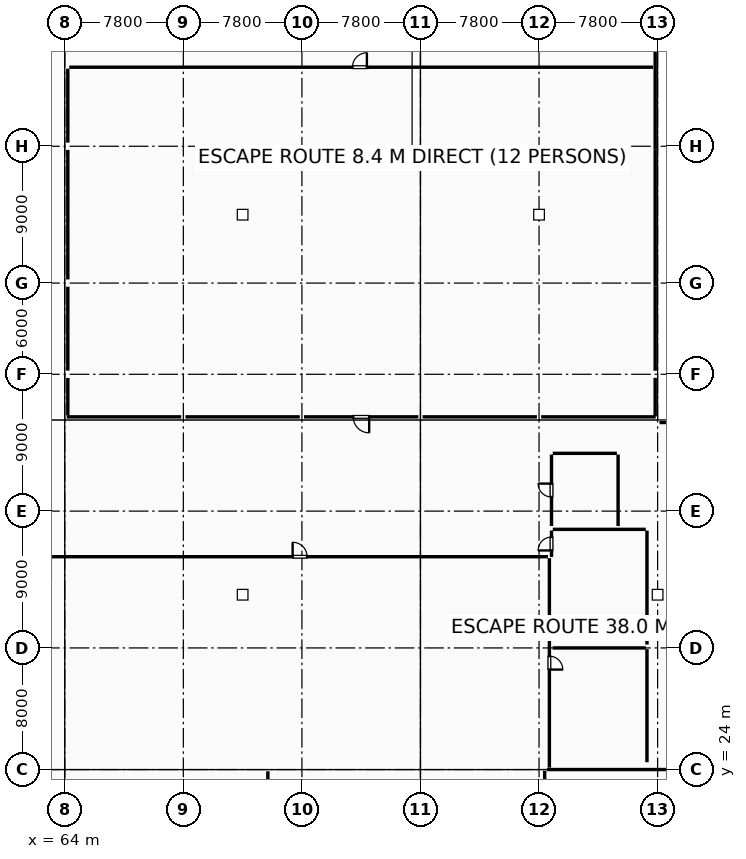
"""IFC4 building model, lengths in metres.
Left out: names, types, materials, properties, quantities, classifications, styles, units other than length and angle.
Written with IfcOpenShell. Run it as: python <this file> out.ifc"""

import sys

from ifc_helpers import new_model, si_unit, direction, frame, frame_2d, origin, origin_2d, place, context, subcontext, project, spatial, rectangle, hollow_rectangle, i_section, extrude, element, fill, save


model = new_model("IFC4")
c1 = context("Model", 3, precision=1e-05, world=origin(), true_north=direction((0.0, 1.0)))
c2 = subcontext(c1, "Body", "Model", "MODEL_VIEW")
j1 = project(units=[si_unit("LENGTHUNIT", "METRE"), si_unit("PLANEANGLEUNIT", "RADIAN")], contexts=[c1])
p1 = place(None, origin())
s1 = spatial("IfcSite", under=j1, at=p1, CompositionType="ELEMENT")
p2 = place(p1, origin())
s2 = spatial("IfcBuilding", under=s1, at=p2, CompositionType="ELEMENT")
p3 = place(p2, origin())
s3 = spatial("IfcBuildingStorey", under=s2, at=p3, CompositionType="ELEMENT", Elevation=0.0)
p4 = place(p3, frame((64.0, 50.0, 0.0), z_axis=(0.0, 0.0, 1.0), x_axis=(1.0, 0.0, 0.0)))
e1 = element("IfcColumn", 1, at=p4, inside=s3, PredefinedType="COLUMN", context=c2, shape_type="SweptSolid", body=[
    extrude(hollow_rectangle(XDim=0.45, YDim=0.45, WallThickness=0.02, at=origin_2d()), origin(), (0.0, 0.0, 1.0), 5.4),
])
for number, where, z_axis, x_axis in (
    (2, (64.0, 56.0, 0.0), (0.0, 0.0, 1.0), (1.0, 0.0, 0.0)),
    (3, (64.0, 65.0, 0.0), (0.0, 0.0, 1.0), (1.0, 0.0, 0.0)),
):
    element("IfcColumn", number, at=place(p3, frame(where, z_axis=z_axis, x_axis=x_axis)), inside=s3, PredefinedType="COLUMN", context=c2, shape_type="SweptSolid", body=[
        extrude(i_section(OverallWidth=0.25, OverallDepth=0.45, WebThickness=0.011, FlangeThickness=0.014, FilletRadius=0.015, at=origin_2d()), origin(), (0.0, 0.0, 1.0), 5.4),
    ])
p5 = place(p3, frame((103.0, 50.0, 0.0), z_axis=(0.0, 0.0, 1.0), x_axis=(1.0, 0.0, 0.0)))
e4 = element("IfcColumn", 4, at=p5, inside=s3, PredefinedType="COLUMN", context=c2, shape_type="SweptSolid", body=[
    extrude(hollow_rectangle(XDim=0.45, YDim=0.45, WallThickness=0.02, at=origin_2d()), origin(), (0.0, 0.0, 1.0), 5.4),
])
for number, where, z_axis, x_axis in (
    (5, (103.0, 56.0, 0.0), (0.0, 0.0, 1.0), (1.0, 0.0, 0.0)),
    (6, (103.0, 65.0, 0.0), (0.0, 0.0, 1.0), (1.0, 0.0, 0.0)),
    (7, (64.0, 47.0, 0.0), (0.0, 0.0, 1.0), (1.0, 0.0, 0.0)),
    (8, (71.8, 47.0, 0.0), (0.0, 0.0, 1.0), (1.0, 0.0, 0.0)),
    (9, (79.6, 47.0, 0.0), (0.0, 0.0, 1.0), (1.0, 0.0, 0.0)),
    (10, (87.4, 47.0, 0.0), (0.0, 0.0, 1.0), (1.0, 0.0, 0.0)),
    (11, (95.2, 47.0, 0.0), (0.0, 0.0, 1.0), (1.0, 0.0, 0.0)),
    (12, (103.0, 47.0, 0.0), (0.0, 0.0, 1.0), (1.0, 0.0, 0.0)),
):
    element("IfcColumn", number, at=place(p3, frame(where, z_axis=z_axis, x_axis=x_axis)), inside=s3, PredefinedType="COLUMN", context=c2, shape_type="SweptSolid", body=[
        extrude(i_section(OverallWidth=0.25, OverallDepth=0.45, WebThickness=0.011, FlangeThickness=0.014, FilletRadius=0.015, at=origin_2d()), origin(), (0.0, 0.0, 1.0), 5.4),
    ])
p6 = place(p3, frame((70.0, 41.0, 0.0), z_axis=(0.0, 0.0, 1.0), x_axis=(1.0, 0.0, 0.0)))
e13 = element("IfcColumn", 13, at=p6, inside=s3, PredefinedType="COLUMN", context=c2, shape_type="SweptSolid", body=[
    extrude(rectangle(XDim=1.2, YDim=1.2, at=origin_2d()), origin(), (0.0, 0.0, 1.0), 5.4),
])
for number, where, z_axis, x_axis in (
    (14, (79.6, 41.0, 0.0), (0.0, 0.0, 1.0), (1.0, 0.0, 0.0)),
    (15, (87.4, 41.0, 0.0), (0.0, 0.0, 1.0), (1.0, 0.0, 0.0)),
    (16, (95.2, 41.0, 0.0), (0.0, 0.0, 1.0), (1.0, 0.0, 0.0)),
    (17, (103.0, 41.0, 0.0), (0.0, 0.0, 1.0), (1.0, 0.0, 0.0)),
):
    element("IfcColumn", number, at=place(p3, frame(where, z_axis=z_axis, x_axis=x_axis)), inside=s3, PredefinedType="COLUMN", context=c2, shape_type="SweptSolid", body=[
        extrude(rectangle(XDim=1.05, YDim=1.05, at=origin_2d()), origin(), (0.0, 0.0, 1.0), 5.4),
    ])
p7 = place(p3, frame((102.84, 73.767, 0.0), z_axis=(0.0, 0.0, 1.0), x_axis=(0.0, -1.0, 0.0)))
e18 = element("IfcWall", 18, at=p7, inside=s3, PredefinedType="STANDARD", context=c2, shape_type="SweptSolid", body=[
    extrude(rectangle(XDim=9.0, YDim=0.28, at=frame_2d((4.5, 0.0))), origin(), (0.0, 0.0, 1.0), 4.555),
])
p8 = place(p3, frame((102.84, 64.767, 0.0), z_axis=(0.0, 0.0, 1.0), x_axis=(0.0, -1.0, 0.0)))
e19 = element("IfcWall", 19, at=p8, inside=s3, PredefinedType="STANDARD", context=c2, shape_type="SweptSolid", body=[
    extrude(rectangle(XDim=9.0, YDim=0.28, at=frame_2d((4.5, 0.0))), origin(), (0.0, 0.0, 1.0), 4.505),
])
p9 = place(p3, frame((102.84, 55.767, 0.0), z_axis=(0.0, 0.0, 1.0), x_axis=(0.0, -1.0, 0.0)))
e20 = element("IfcWall", 20, at=p9, inside=s3, PredefinedType="STANDARD", context=c2, shape_type="SweptSolid", body=[
    extrude(rectangle(XDim=5.534, YDim=0.28, at=frame_2d((2.767, 0.0))), origin(), (0.0, 0.0, 1.0), 4.655),
])
p10 = place(p3, frame((102.84, 49.767, 0.0), z_axis=(0.0, 0.0, 1.0), x_axis=(0.0, -1.0, 0.0)))
e21 = element("IfcWall", 21, at=p10, inside=s3, PredefinedType="STANDARD", context=c2, shape_type="SweptSolid", body=[
    extrude(rectangle(XDim=2.534, YDim=0.28, at=frame_2d((1.267, 0.0))), origin(), (0.0, 0.0, 1.0), 4.455),
])
p11 = place(p3, frame((103.124, 46.83, 0.0), z_axis=(0.0, 0.0, 1.0), x_axis=(1.0, 0.0, 0.0)))
e22 = element("IfcWall", 22, at=p11, inside=s3, PredefinedType="STANDARD", context=c2, shape_type="SweptSolid", body=[
    extrude(rectangle(XDim=15.872, YDim=0.3, at=frame_2d((7.936, 0.0))), origin(), (0.0, 0.0, 1.0), 4.305),
])
p12 = place(p11, frame((7.126, 0.0, 0.95)))
e23 = element("IfcOpeningElement", 23, at=p12, cuts=e22, PredefinedType="OPENING", context=c2, shape_type="SweptSolid", body=[
    extrude(rectangle(XDim=1.1, YDim=1.5, at=frame_2d((0.55, 0.75))), frame((0.0, 0.16, 0.0), z_axis=(0.0, -1.0, 0.0), x_axis=(1.0, 0.0, 0.0)), (0.0, 0.0, 1.0), 0.32),
])
p13 = place(p3, frame((63.145, 38.0, 0.0), z_axis=(0.0, 0.0, 1.0), x_axis=(1.0, 0.0, 0.0)))
e24 = element("IfcWall", 24, at=p13, inside=s3, PredefinedType="PARTITIONING", context=c2, shape_type="SweptSolid", body=[
    extrude(rectangle(XDim=32.64, YDim=0.15, at=frame_2d((16.32, 0.0))), origin(), (0.0, 0.0, 1.0), 4.3),
])
p14 = place(p13, frame((15.845, 0.0, 0.0)))
e25 = element("IfcOpeningElement", 25, at=p14, cuts=e24, PredefinedType="OPENING", context=c2, shape_type="SweptSolid", body=[
    extrude(rectangle(XDim=0.95, YDim=2.15, at=frame_2d((0.475, 1.075))), frame((0.0, 0.085, 0.0), z_axis=(0.0, -1.0, 0.0), x_axis=(1.0, 0.0, 0.0)), (0.0, 0.0, 1.0), 0.17),
])
p15 = place(p3, frame((95.88, 37.905, 0.0), z_axis=(0.0, 0.0, 1.0), x_axis=(0.0, -1.0, 0.0)))
e26 = element("IfcWall", 26, at=p15, inside=s3, PredefinedType="PARTITIONING", context=c2, shape_type="SweptSolid", body=[
    extrude(rectangle(XDim=13.78, YDim=0.15, at=frame_2d((6.89, 0.0))), origin(), (0.0, 0.0, 1.0), 5.4),
])
p16 = place(p15, frame((6.45, 0.0, 0.0)))
e27 = element("IfcOpeningElement", 27, at=p16, cuts=e26, PredefinedType="OPENING", context=c2, shape_type="SweptSolid", body=[
    extrude(rectangle(XDim=0.88, YDim=2.1, at=frame_2d((0.44, 1.05))), frame((0.0, 0.085, 0.0), z_axis=(0.0, -1.0, 0.0), x_axis=(1.0, 0.0, 0.0)), (0.0, 0.0, 1.0), 0.17),
])
p17 = place(p3, frame((95.57, 23.905, 0.0), z_axis=(0.0, 0.0, 1.0), x_axis=(0.0, -1.0, 0.0)))
e28 = element("IfcWall", 28, at=p17, inside=s3, PredefinedType="PARTITIONING", context=c2, shape_type="SweptSolid", body=[
    extrude(rectangle(XDim=7.365, YDim=0.15, at=frame_2d((3.683, 0.0))), origin(), (0.0, 0.0, 1.0), 4.3),
])
p18 = place(p17, frame((3.158, 0.0, 0.0)))
e29 = element("IfcOpeningElement", 29, at=p18, cuts=e28, PredefinedType="OPENING", context=c2, shape_type="SweptSolid", body=[
    extrude(rectangle(XDim=1.05, YDim=2.15, at=frame_2d((0.525, 1.075))), frame((0.0, 0.085, 0.0), z_axis=(0.0, -1.0, 0.0), x_axis=(1.0, 0.0, 0.0)), (0.0, 0.0, 1.0), 0.17),
])
p19 = place(p3, frame((95.72, 24.0, 0.0), z_axis=(0.0, 0.0, 1.0), x_axis=(1.0, 0.0, 0.0)))
e30 = element("IfcWall", 30, at=p19, inside=s3, PredefinedType="PARTITIONING", context=c2, shape_type="SweptSolid", body=[
    extrude(rectangle(XDim=16.36, YDim=0.2, at=frame_2d((8.18, 0.0))), origin(), (0.0, 0.0, 1.0), 4.3),
])
p20 = place(p3, frame((64.295, 70.2, 0.0), z_axis=(0.0, 0.0, 1.0), x_axis=(1.0, 0.0, 0.0)))
e31 = element("IfcWall", 31, at=p20, inside=s3, PredefinedType="PARTITIONING", context=c2, shape_type="SweptSolid", body=[
    extrude(rectangle(XDim=38.401, YDim=0.15, at=frame_2d((19.201, 0.0))), origin(), (0.0, 0.0, 1.0), 5.11),
])
p21 = place(p20, frame((18.63, 0.0, 0.0)))
e32 = element("IfcOpeningElement", 32, at=p21, cuts=e31, PredefinedType="OPENING", context=c2, shape_type="SweptSolid", body=[
    extrude(rectangle(XDim=0.95, YDim=2.15, at=frame_2d((0.475, 1.075))), frame((0.0, 0.085, 0.0), z_axis=(0.0, -1.0, 0.0), x_axis=(1.0, 0.0, 0.0)), (0.0, 0.0, 1.0), 0.17),
])
p22 = place(p3, frame((102.871, 47.2, 0.0), z_axis=(0.0, 0.0, 1.0), x_axis=(-1.0, 0.0, 0.0)))
e33 = element("IfcWall", 33, at=p22, inside=s3, PredefinedType="PARTITIONING", context=c2, shape_type="SweptSolid", body=[
    extrude(rectangle(XDim=7.531, YDim=0.15, at=frame_2d((3.766, 0.0))), origin(), (0.0, 0.0, 1.0), 4.3),
])
p23 = place(p3, frame((95.06, 47.2, 0.0), z_axis=(0.0, 0.0, 1.0), x_axis=(-1.0, 0.0, 0.0)))
e34 = element("IfcWall", 34, at=p23, inside=s3, PredefinedType="PARTITIONING", context=c2, shape_type="SweptSolid", body=[
    extrude(rectangle(XDim=7.52, YDim=0.15, at=frame_2d((3.76, 0.0))), origin(), (0.0, 0.0, 1.0), 4.3),
])
p24 = place(p3, frame((87.26, 47.2, 0.0), z_axis=(0.0, 0.0, 1.0), x_axis=(-1.0, 0.0, 0.0)))
e35 = element("IfcWall", 35, at=p24, inside=s3, PredefinedType="PARTITIONING", context=c2, shape_type="SweptSolid", body=[
    extrude(rectangle(XDim=7.52, YDim=0.15, at=frame_2d((3.76, 0.0))), origin(), (0.0, 0.0, 1.0), 4.3),
])
p25 = place(p24, frame((3.235, 0.0, 0.0)))
e36 = element("IfcOpeningElement", 36, at=p25, cuts=e35, PredefinedType="OPENING", context=c2, shape_type="SweptSolid", body=[
    extrude(rectangle(XDim=1.05, YDim=2.15, at=frame_2d((0.525, 1.075))), frame((0.0, 0.085, 0.0), z_axis=(0.0, -1.0, 0.0), x_axis=(1.0, 0.0, 0.0)), (0.0, 0.0, 1.0), 0.17),
])
p26 = place(p3, frame((79.46, 47.2, 0.0), z_axis=(0.0, 0.0, 1.0), x_axis=(-1.0, 0.0, 0.0)))
e37 = element("IfcWall", 37, at=p26, inside=s3, PredefinedType="PARTITIONING", context=c2, shape_type="SweptSolid", body=[
    extrude(rectangle(XDim=7.52, YDim=0.15, at=frame_2d((3.76, 0.0))), origin(), (0.0, 0.0, 1.0), 4.3),
])
p27 = place(p3, frame((71.66, 47.2, 0.0), z_axis=(0.0, 0.0, 1.0), x_axis=(-1.0, 0.0, 0.0)))
e38 = element("IfcWall", 38, at=p27, inside=s3, PredefinedType="PARTITIONING", context=c2, shape_type="SweptSolid", body=[
    extrude(rectangle(XDim=7.531, YDim=0.15, at=frame_2d((3.766, 0.0))), origin(), (0.0, 0.0, 1.0), 4.3),
])
p28 = place(p3, frame((64.2, 47.295, 0.0), z_axis=(0.0, 0.0, 1.0), x_axis=(0.0, 1.0, 0.0)))
e39 = element("IfcWall", 39, at=p28, inside=s3, PredefinedType="PARTITIONING", context=c2, shape_type="SweptSolid", body=[
    extrude(rectangle(XDim=2.465, YDim=0.15, at=frame_2d((1.232, 0.0))), origin(), (0.0, 0.0, 1.0), 4.5),
])
p29 = place(p3, frame((64.2, 50.24, 0.0), z_axis=(0.0, 0.0, 1.0), x_axis=(0.0, 1.0, 0.0)))
e40 = element("IfcWall", 40, at=p29, inside=s3, PredefinedType="PARTITIONING", context=c2, shape_type="SweptSolid", body=[
    extrude(rectangle(XDim=5.52, YDim=0.15, at=frame_2d((2.76, 0.0))), origin(), (0.0, 0.0, 1.0), 4.55),
])
p30 = place(p3, frame((64.2, 56.24, 0.0), z_axis=(0.0, 0.0, 1.0), x_axis=(0.0, 1.0, 0.0)))
e41 = element("IfcWall", 41, at=p30, inside=s3, PredefinedType="PARTITIONING", context=c2, shape_type="SweptSolid", body=[
    extrude(rectangle(XDim=8.52, YDim=0.15, at=frame_2d((4.26, 0.0))), origin(), (0.0, 0.0, 1.0), 4.6),
])
p31 = place(p3, frame((64.2, 65.24, 0.0), z_axis=(0.0, 0.0, 1.0), x_axis=(0.0, 1.0, 0.0)))
e42 = element("IfcWall", 42, at=p31, inside=s3, PredefinedType="PARTITIONING", context=c2, shape_type="SweptSolid", body=[
    extrude(rectangle(XDim=4.865, YDim=0.15, at=frame_2d((2.433, 0.0))), origin(), (0.0, 0.0, 1.0), 4.65),
])
p32 = place(p3, frame((102.3, 31.92, 0.0), z_axis=(0.0, 0.0, 1.0), x_axis=(0.0, -1.0, 0.0)))
e43 = element("IfcWall", 43, at=p32, inside=s3, PredefinedType="PARTITIONING", context=c2, shape_type="SweptSolid", body=[
    extrude(rectangle(XDim=7.44, YDim=0.12, at=frame_2d((3.72, 0.0))), origin(), (0.0, 0.0, 1.0), 5.4),
])
p33 = place(p3, frame((96.1, 32.0, 0.0), z_axis=(0.0, 0.0, 1.0), x_axis=(1.0, 0.0, 0.0)))
e44 = element("IfcWall", 44, at=p33, inside=s3, PredefinedType="PARTITIONING", context=c2, shape_type="SweptSolid", body=[
    extrude(rectangle(XDim=6.12, YDim=0.12, at=frame_2d((3.06, 0.0))), origin(), (0.0, 0.0, 1.0), 5.4),
])
p34 = place(p3, frame((102.3, 39.72, 0.0), z_axis=(0.0, 0.0, 1.0), x_axis=(0.0, -1.0, 0.0)))
e45 = element("IfcWall", 45, at=p34, inside=s3, PredefinedType="PARTITIONING", context=c2, shape_type="SweptSolid", body=[
    extrude(rectangle(XDim=7.5, YDim=0.12, at=frame_2d((3.75, 0.0))), origin(), (0.0, 0.0, 1.0), 5.11),
])
p35 = place(p3, frame((96.02, 37.985, 0.0), z_axis=(0.0, 0.0, 1.0), x_axis=(0.0, 1.0, 0.0)))
e46 = element("IfcWall", 46, at=p35, inside=s3, PredefinedType="PARTITIONING", context=c2, shape_type="SweptSolid", body=[
    extrude(rectangle(XDim=1.735, YDim=0.12, at=frame_2d((0.867, 0.0))), origin(), (0.0, 0.0, 1.0), 5.11),
])
p36 = place(p35, frame((0.427, 0.0, 0.0)))
e47 = element("IfcOpeningElement", 47, at=p36, cuts=e46, PredefinedType="OPENING", context=c2, shape_type="SweptSolid", body=[
    extrude(rectangle(XDim=0.88, YDim=2.1, at=frame_2d((0.44, 1.05))), frame((0.0, 0.07, 0.0), z_axis=(0.0, -1.0, 0.0), x_axis=(1.0, 0.0, 0.0)), (0.0, 0.0, 1.0), 0.14),
])
p37 = place(p3, frame((96.1, 39.8, 0.0), z_axis=(0.0, 0.0, 1.0), x_axis=(1.0, 0.0, 0.0)))
e48 = element("IfcWall", 48, at=p37, inside=s3, PredefinedType="PARTITIONING", context=c2, shape_type="SweptSolid", body=[
    extrude(rectangle(XDim=6.12, YDim=0.12, at=frame_2d((3.06, 0.0))), origin(), (0.0, 0.0, 1.0), 5.11),
])
p38 = place(p3, frame((100.4, 44.72, 0.0), z_axis=(0.0, 0.0, 1.0), x_axis=(0.0, -1.0, 0.0)))
e49 = element("IfcWall", 49, at=p38, inside=s3, PredefinedType="PARTITIONING", context=c2, shape_type="SweptSolid", body=[
    extrude(rectangle(XDim=4.7, YDim=0.12, at=frame_2d((2.35, 0.0))), origin(), (0.0, 0.0, 1.0), 4.75),
])
p39 = place(p3, frame((96.02, 40.02, 0.0), z_axis=(0.0, 0.0, 1.0), x_axis=(0.0, 1.0, 0.0)))
e50 = element("IfcWall", 50, at=p39, inside=s3, PredefinedType="PARTITIONING", context=c2, shape_type="SweptSolid", body=[
    extrude(rectangle(XDim=4.7, YDim=0.12, at=frame_2d((2.35, 0.0))), origin(), (0.0, 0.0, 1.0), 5.11),
])
p40 = place(p39, frame((1.91, 0.0, 0.0)))
e51 = element("IfcOpeningElement", 51, at=p40, cuts=e50, PredefinedType="OPENING", context=c2, shape_type="SweptSolid", body=[
    extrude(rectangle(XDim=0.88, YDim=2.1, at=frame_2d((0.44, 1.05))), frame((0.0, 0.07, 0.0), z_axis=(0.0, -1.0, 0.0), x_axis=(1.0, 0.0, 0.0)), (0.0, 0.0, 1.0), 0.14),
])
p41 = place(p3, frame((96.1, 44.8, 0.0), z_axis=(0.0, 0.0, 1.0), x_axis=(1.0, 0.0, 0.0)))
e52 = element("IfcWall", 52, at=p41, inside=s3, PredefinedType="PARTITIONING", context=c2, shape_type="SweptSolid", body=[
    extrude(rectangle(XDim=4.22, YDim=0.12, at=frame_2d((2.11, 0.0))), origin(), (0.0, 0.0, 1.0), 5.11),
])
p42 = place(p14, origin())
e53 = element("IfcDoor", 53, at=p42, inside=s3, OperationType="SINGLE_SWING_LEFT", PredefinedType="DOOR", context=c2, shape_type="SweptSolid", body=[
    extrude(rectangle(XDim=0.95, YDim=2.15, at=frame_2d((0.475, 1.075))), frame((0.0, 0.025, 0.0), z_axis=(0.0, -1.0, 0.0), x_axis=(1.0, 0.0, 0.0)), (0.0, 0.0, 1.0), 0.05),
])
fill(e25, e53)
p43 = place(p21, origin())
e54 = element("IfcDoor", 54, at=p43, inside=s3, OperationType="SINGLE_SWING_RIGHT", PredefinedType="DOOR", context=c2, shape_type="SweptSolid", body=[
    extrude(rectangle(XDim=0.95, YDim=2.15, at=frame_2d((0.475, 1.075))), frame((0.0, 0.025, 0.0), z_axis=(0.0, -1.0, 0.0), x_axis=(1.0, 0.0, 0.0)), (0.0, 0.0, 1.0), 0.05),
])
fill(e32, e54)
p44 = place(p25, origin())
e55 = element("IfcDoor", 55, at=p44, inside=s3, OperationType="SINGLE_SWING_LEFT", PredefinedType="DOOR", context=c2, shape_type="SweptSolid", body=[
    extrude(rectangle(XDim=1.05, YDim=2.15, at=frame_2d((0.525, 1.075))), frame((0.0, 0.025, 0.0), z_axis=(0.0, -1.0, 0.0), x_axis=(1.0, 0.0, 0.0)), (0.0, 0.0, 1.0), 0.05),
])
fill(e36, e55)
p45 = place(p16, origin())
e56 = element("IfcDoor", 56, at=p45, inside=s3, OperationType="SINGLE_SWING_RIGHT", PredefinedType="DOOR", context=c2, shape_type="SweptSolid", body=[
    extrude(rectangle(XDim=0.88, YDim=2.1, at=frame_2d((0.44, 1.05))), frame((0.0, 0.025, 0.0), z_axis=(0.0, -1.0, 0.0), x_axis=(1.0, 0.0, 0.0)), (0.0, 0.0, 1.0), 0.05),
])
fill(e27, e56)
p46 = place(p36, origin())
e57 = element("IfcDoor", 57, at=p46, inside=s3, OperationType="SINGLE_SWING_LEFT", PredefinedType="DOOR", context=c2, shape_type="SweptSolid", body=[
    extrude(rectangle(XDim=0.88, YDim=2.1, at=frame_2d((0.44, 1.05))), frame((0.0, 0.025, 0.0), z_axis=(0.0, -1.0, 0.0), x_axis=(1.0, 0.0, 0.0)), (0.0, 0.0, 1.0), 0.05),
])
fill(e47, e57)
p47 = place(p40, origin())
e58 = element("IfcDoor", 58, at=p47, inside=s3, OperationType="SINGLE_SWING_RIGHT", PredefinedType="DOOR", context=c2, shape_type="SweptSolid", body=[
    extrude(rectangle(XDim=0.88, YDim=2.1, at=frame_2d((0.44, 1.05))), frame((0.0, 0.025, 0.0), z_axis=(0.0, -1.0, 0.0), x_axis=(1.0, 0.0, 0.0)), (0.0, 0.0, 1.0), 0.05),
])
fill(e51, e58)
save(model, sys.argv[1])
